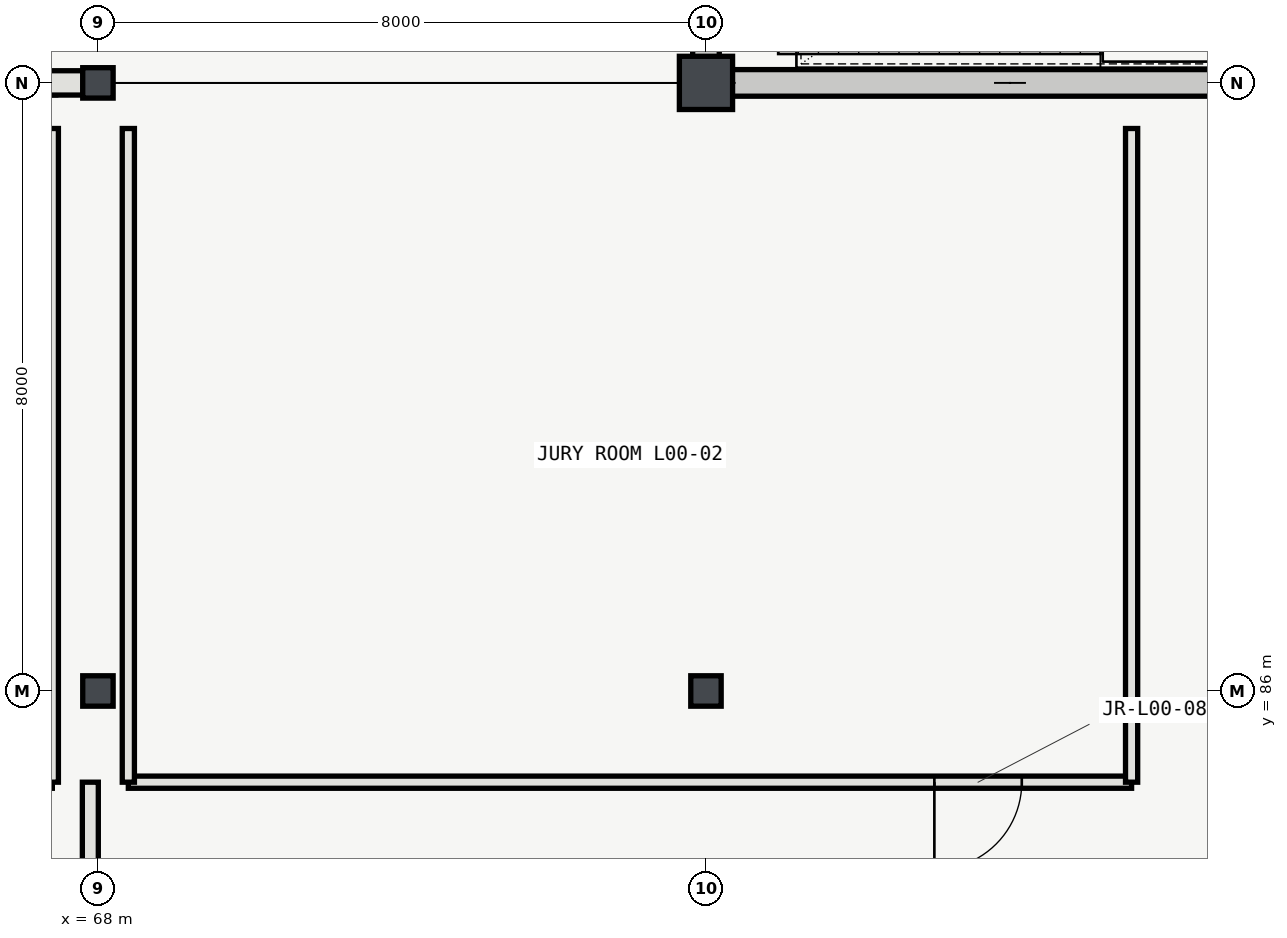
"""IFC4 building model, lengths in metres.
Left out: names, types, materials, properties, quantities, classifications, styles, units other than length and angle.
Written with IfcOpenShell. Run it as: python <this file> out.ifc"""

import sys

from ifc_helpers import new_model, si_unit, direction, frame, frame_2d, origin, origin_2d, place, context, subcontext, project, spatial, rectangle, i_section, extrude, element, fill, save


model = new_model("IFC4")
c1 = context("Model", 3, precision=1e-05, world=origin(), true_north=direction((0.0, 1.0)))
c2 = subcontext(c1, "Body", "Model", "MODEL_VIEW")
j1 = project(units=[si_unit("LENGTHUNIT", "METRE"), si_unit("PLANEANGLEUNIT", "RADIAN")], contexts=[c1])
p1 = place(None, origin())
s1 = spatial("IfcSite", under=j1, at=p1, CompositionType="ELEMENT")
p2 = place(p1, origin())
s2 = spatial("IfcBuilding", under=s1, at=p2, CompositionType="ELEMENT")
p3 = place(p2, origin())
s3 = spatial("IfcBuildingStorey", under=s2, at=p3, CompositionType="ELEMENT", Elevation=0.0)
for number, where, z_axis, x_axis in (
    (1, (68.0, 86.0, 0.0), (0.0, 0.0, 1.0), (1.0, 0.0, 0.0)),
    (2, (68.0, 94.0, 0.0), (0.0, 0.0, 1.0), (1.0, 0.0, 0.0)),
    (3, (76.0, 86.0, 0.0), (0.0, 0.0, 1.0), (1.0, 0.0, 0.0)),
):
    element("IfcColumn", number, at=place(p3, frame(where, z_axis=z_axis, x_axis=x_axis)), inside=s3, PredefinedType="COLUMN", context=c2, shape_type="SweptSolid", body=[
        extrude(i_section(OverallWidth=0.4, OverallDepth=0.4, WebThickness=0.013, FlangeThickness=0.021, FilletRadius=0.022, at=origin_2d()), origin(), (0.0, 0.0, 1.0), 5.4),
    ])
p4 = place(p3, frame((76.0, 94.0, 0.0), z_axis=(0.0, 0.0, 1.0), x_axis=(1.0, 0.0, 0.0)))
e4 = element("IfcColumn", 4, at=p4, inside=s3, PredefinedType="COLUMN", context=c2, shape_type="SweptSolid", body=[
    extrude(rectangle(XDim=0.7, YDim=0.7, at=origin_2d()), origin(), (0.0, 0.0, 1.0), 5.4),
])
p5 = place(p3, frame((67.804, 94.0, 0.0), z_axis=(0.0, 0.0, 1.0), x_axis=(-1.0, 0.0, 0.0)))
e5 = element("IfcWall", 5, at=p5, inside=s3, PredefinedType="SOLIDWALL", context=c2, shape_type="SweptSolid", body=[
    extrude(rectangle(XDim=7.608, YDim=0.32, at=frame_2d((3.804, 0.0))), origin(), (0.0, 0.0, 1.0), 4.663),
])
p6 = place(p5, frame((2.829, 0.0, 0.95)))
e6 = element("IfcOpeningElement", 6, at=p6, cuts=e5, PredefinedType="OPENING", context=c2, shape_type="SweptSolid", body=[
    extrude(rectangle(XDim=1.95, YDim=1.95, at=frame_2d((0.975, 0.975))), frame((0.0, 0.17, 0.0), z_axis=(0.0, -1.0, 0.0), x_axis=(1.0, 0.0, 0.0)), (0.0, 0.0, 1.0), 0.34),
])
p7 = place(p3, frame((75.825, 94.0, 0.0), z_axis=(0.0, 0.0, 1.0), x_axis=(1.0, 0.0, 0.0)))
e7 = element("IfcWall", 7, at=p7, inside=s3, PredefinedType="SHEAR", context=c2, shape_type="SweptSolid", body=[
    extrude(rectangle(XDim=8.35, YDim=0.35, at=frame_2d((4.175, 0.0))), origin(), (0.0, 0.0, 1.0), 5.12),
])
p8 = place(p3, frame((76.0, 94.175, 0.0), z_axis=(0.0, 0.0, 1.0), x_axis=(0.0, 1.0, 0.0)))
e8 = element("IfcWall", 8, at=p8, inside=s3, PredefinedType="SHEAR", context=c2, shape_type="SweptSolid", body=[
    extrude(rectangle(XDim=8.65, YDim=0.35, at=frame_2d((4.325, 0.0))), origin(), (0.0, 0.0, 1.0), 5.12),
])
p9 = place(p8, frame((1.65, 0.0, 0.0)))
e9 = element("IfcOpeningElement", 9, at=p9, cuts=e8, PredefinedType="OPENING", context=c2, shape_type="SweptSolid", body=[
    extrude(rectangle(XDim=1.35, YDim=2.2, at=frame_2d((0.675, 1.1))), frame((0.0, 0.185, 0.0), z_axis=(0.0, -1.0, 0.0), x_axis=(1.0, 0.0, 0.0)), (0.0, 0.0, 1.0), 0.37),
])
p10 = place(p3, frame((67.4, 84.8, 0.0), z_axis=(0.0, 0.0, 1.0), x_axis=(0.0, 1.0, 0.0)))
e10 = element("IfcWall", 10, at=p10, inside=s3, PredefinedType="PARTITIONING", context=c2, shape_type="SweptSolid", body=[
    extrude(rectangle(XDim=8.6, YDim=0.16, at=frame_2d((4.3, 0.0))), origin(), (0.0, 0.0, 1.0), 5.12),
])
p11 = place(p3, frame((68.4, 84.8, 0.0), z_axis=(0.0, 0.0, 1.0), x_axis=(1.0, 0.0, 0.0)))
e11 = element("IfcWall", 11, at=p11, inside=s3, PredefinedType="PARTITIONING", context=c2, shape_type="SweptSolid", body=[
    extrude(rectangle(XDim=13.2, YDim=0.16, at=frame_2d((6.6, 0.0))), origin(), (0.0, 0.0, 1.0), 5.12),
])
p12 = place(p11, frame((10.605, 0.0, 0.0)))
e12 = element("IfcOpeningElement", 12, at=p12, cuts=e11, PredefinedType="OPENING", context=c2, shape_type="SweptSolid", body=[
    extrude(rectangle(XDim=1.15, YDim=2.2, at=frame_2d((0.575, 1.1))), frame((0.0, 0.09, 0.0), z_axis=(0.0, -1.0, 0.0), x_axis=(1.0, 0.0, 0.0)), (0.0, 0.0, 1.0), 0.18),
])
for number, where, z_axis, x_axis in (
    (13, (68.4, 93.4, 0.0), (0.0, 0.0, 1.0), (0.0, -1.0, 0.0)),
    (14, (81.6, 84.8, 0.0), (0.0, 0.0, 1.0), (0.0, 1.0, 0.0)),
):
    element("IfcWall", number, at=place(p3, frame(where, z_axis=z_axis, x_axis=x_axis)), inside=s3, PredefinedType="PARTITIONING", context=c2, shape_type="SweptSolid", body=[
        extrude(rectangle(XDim=8.6, YDim=0.16, at=frame_2d((4.3, 0.0))), origin(), (0.0, 0.0, 1.0), 5.12),
    ])
p13 = place(p3, frame((67.9, 80.2, 0.0), z_axis=(0.0, 0.0, 1.0), x_axis=(0.0, 1.0, 0.0)))
e15 = element("IfcWall", 15, at=p13, inside=s3, PredefinedType="PARTITIONING", context=c2, shape_type="SweptSolid", body=[
    extrude(rectangle(XDim=4.6, YDim=0.21, at=frame_2d((2.3, 0.0))), origin(), (0.0, 0.0, 1.0), 3.2),
])
p14 = place(p13, frame((1.25, 0.0, 0.0)))
e16 = element("IfcOpeningElement", 16, at=p14, cuts=e15, PredefinedType="OPENING", context=c2, shape_type="SweptSolid", body=[
    extrude(rectangle(XDim=2.1, YDim=2.2, at=frame_2d((1.05, 1.1))), frame((0.0, 0.115, 0.0), z_axis=(0.0, -1.0, 0.0), x_axis=(1.0, 0.0, 0.0)), (0.0, 0.0, 1.0), 0.23),
])
p15 = place(p12, origin())
e17 = element("IfcDoor", 17, at=p15, inside=s3, OperationType="SINGLE_SWING_LEFT", PredefinedType="DOOR", context=c2, shape_type="SweptSolid", body=[
    extrude(rectangle(XDim=1.15, YDim=2.2, at=frame_2d((0.575, 1.1))), frame((0.0, 0.025, 0.0), z_axis=(0.0, -1.0, 0.0), x_axis=(1.0, 0.0, 0.0)), (0.0, 0.0, 1.0), 0.05),
])
fill(e12, e17)
save(model, sys.argv[1])
